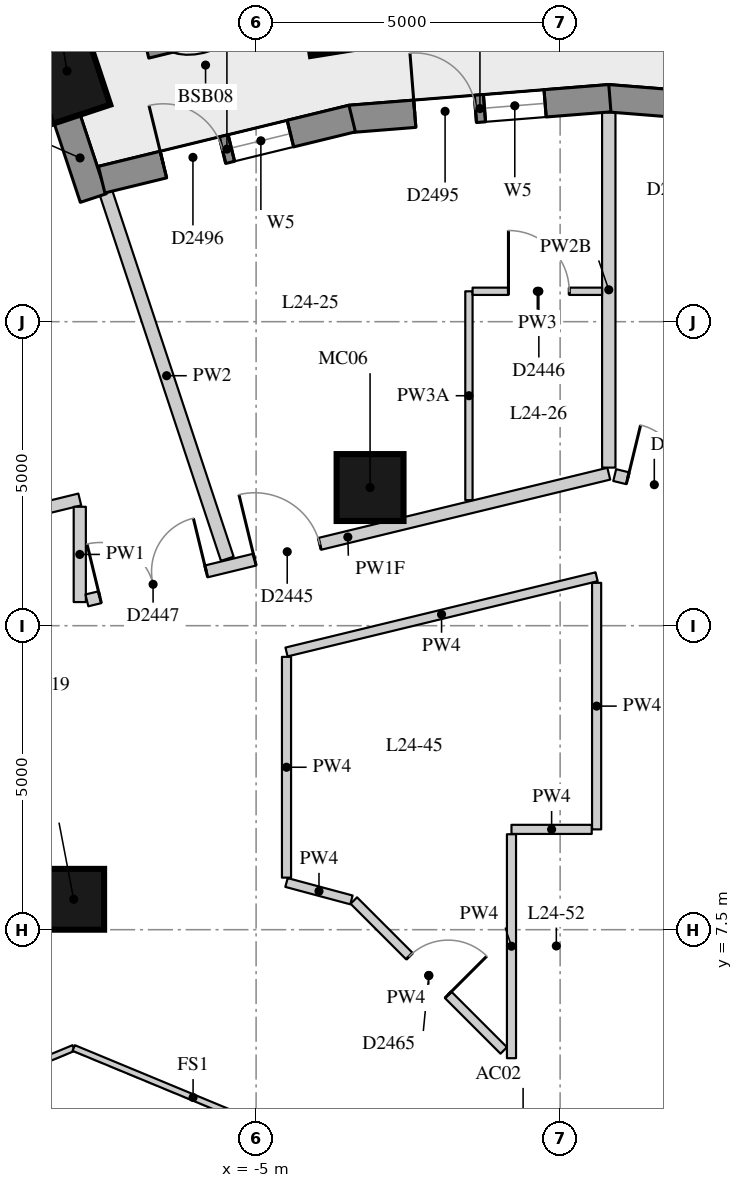
"""IFC4 building model, lengths in metres.
Left out: names, types, materials, properties, quantities, classifications, styles, units other than length and angle.
Written with IfcOpenShell. Run it as: python <this file> out.ifc"""

import sys

from ifc_helpers import new_model, si_unit, direction, frame, frame_2d, origin, origin_2d, place, context, subcontext, project, spatial, rectangle, extrude, element, fill, save


model = new_model("IFC4")
c1 = context("Model", 3, precision=1e-05, world=origin(), true_north=direction((0.0, 1.0)))
c2 = subcontext(c1, "Body", "Model", "MODEL_VIEW")
j1 = project(units=[si_unit("LENGTHUNIT", "METRE"), si_unit("PLANEANGLEUNIT", "RADIAN")], contexts=[c1])
p1 = place(None, origin())
s1 = spatial("IfcSite", under=j1, at=p1, CompositionType="ELEMENT")
p2 = place(p1, origin())
s2 = spatial("IfcBuilding", under=s1, at=p2, CompositionType="ELEMENT")
p3 = place(p2, frame((0.0, 0.0, 88.9)))
s3 = spatial("IfcBuildingStorey", under=s2, at=p3, CompositionType="ELEMENT", Elevation=88.9)
for number, where, z_axis, x_axis in (
    (1, (-3.724, 22.691, 0.0), (0.0, 0.0, 1.0), (-0.159, 0.987, 0.0)),
    (2, (-8.11, 21.624, 0.0), (0.0, 0.0, 1.0), (-0.315, 0.949, 0.0)),
):
    element("IfcColumn", number, at=place(p3, frame(where, z_axis=z_axis, x_axis=x_axis)), inside=s3, PredefinedType="COLUMN", context=c2, shape_type="SweptSolid", body=[
        extrude(rectangle(XDim=1.5, YDim=1.0, at=origin_2d()), origin(), (0.0, 0.0, 1.0), 3.3),
    ])
p4 = place(p3, frame((-8.0, 8.0, 0.0), z_axis=(0.0, 0.0, 1.0), x_axis=(1.0, 0.0, 0.0)))
e3 = element("IfcColumn", 3, at=p4, inside=s3, PredefinedType="COLUMN", context=c2, shape_type="SweptSolid", body=[
    extrude(rectangle(XDim=1.0, YDim=1.0, at=origin_2d()), origin(), (0.0, 0.0, 1.0), 3.3),
])
p5 = place(p3, frame((-3.126, 14.772, 0.0), z_axis=(0.0, 0.0, 1.0), x_axis=(1.0, 0.0, 0.0)))
e4 = element("IfcColumn", 4, at=p5, inside=s3, PredefinedType="COLUMN", context=c2, shape_type="SweptSolid", body=[
    extrude(rectangle(XDim=1.1, YDim=1.1, at=origin_2d()), origin(), (0.0, 0.0, 1.0), 3.3),
])
p6 = place(p3, frame((-8.114, 20.853, 0.0), z_axis=(0.0, 0.0, 1.0), x_axis=(0.314488854508, -0.949261165534, 0.0)))
e5 = element("IfcWall", 5, at=p6, inside=s3, PredefinedType="SOLIDWALL", context=c2, shape_type="SweptSolid", body=[
    extrude(rectangle(XDim=1.39, YDim=0.45, at=frame_2d((0.695, 0.0))), origin(), (0.0, 0.0, 1.0), 3.02),
])
p7 = place(p3, frame((5.038, 20.837, 0.0), z_axis=(0.0, 0.0, 1.0), x_axis=(-0.996839780714, 0.079438350855, 0.0)))
e6 = element("IfcWall", 6, at=p7, inside=s3, PredefinedType="SOLIDWALL", context=c2, shape_type="SweptSolid", body=[
    extrude(rectangle(XDim=4.269, YDim=0.45, at=frame_2d((2.134, 0.0))), origin(), (0.0, 0.0, 1.0), 3.02),
])
p8 = place(p7, frame((1.06, 0.0, 0.4)))
e7 = element("IfcOpeningElement", 7, at=p8, cuts=e6, PredefinedType="OPENING", context=c2, shape_type="SweptSolid", body=[
    extrude(rectangle(XDim=1.0, YDim=1.75, at=frame_2d((0.5, 0.875))), frame((0.0, 0.235, 0.0), z_axis=(0.0, -1.0, 0.0), x_axis=(1.0, 0.0, 0.0)), (0.0, 0.0, 1.0), 0.47),
])
p9 = place(p7, frame((2.209, 0.0, 0.0)))
e8 = element("IfcOpeningElement", 8, at=p9, cuts=e6, PredefinedType="OPENING", context=c2, shape_type="SweptSolid", body=[
    extrude(rectangle(XDim=1.0, YDim=2.15, at=frame_2d((0.5, 1.075))), frame((0.0, 0.235, 0.0), z_axis=(0.0, -1.0, 0.0), x_axis=(1.0, 0.0, 0.0)), (0.0, 0.0, 1.0), 0.47),
])
p10 = place(p3, frame((0.818, 21.176, 0.0), z_axis=(0.0, 0.0, 1.0), x_axis=(-0.996843824935, -0.079387585235, 0.0)))
e9 = element("IfcWall", 9, at=p10, inside=s3, PredefinedType="SOLIDWALL", context=c2, shape_type="SweptSolid", body=[
    extrude(rectangle(XDim=4.287, YDim=0.45, at=frame_2d((2.144, 0.0))), origin(), (0.0, 0.0, 1.0), 3.02),
])
p11 = place(p10, frame((1.068, 0.0, 0.4)))
e10 = element("IfcOpeningElement", 10, at=p11, cuts=e9, PredefinedType="OPENING", context=c2, shape_type="SweptSolid", body=[
    extrude(rectangle(XDim=1.0, YDim=1.75, at=frame_2d((0.5, 0.875))), frame((0.0, 0.235, 0.0), z_axis=(0.0, -1.0, 0.0), x_axis=(1.0, 0.0, 0.0)), (0.0, 0.0, 1.0), 0.47),
])
p12 = place(p10, frame((2.219, 0.0, 0.0)))
e11 = element("IfcOpeningElement", 11, at=p12, cuts=e9, PredefinedType="OPENING", context=c2, shape_type="SweptSolid", body=[
    extrude(rectangle(XDim=1.0, YDim=2.15, at=frame_2d((0.5, 1.075))), frame((0.0, 0.235, 0.0), z_axis=(0.0, -1.0, 0.0), x_axis=(1.0, 0.0, 0.0)), (0.0, 0.0, 1.0), 0.47),
])
p13 = place(p3, frame((-3.42, 20.841, 0.0), z_axis=(0.0, 0.0, 1.0), x_axis=(-0.971511611373, -0.23699195971, 0.0)))
e12 = element("IfcWall", 12, at=p13, inside=s3, PredefinedType="SOLIDWALL", context=c2, shape_type="SweptSolid", body=[
    extrude(rectangle(XDim=4.241, YDim=0.45, at=frame_2d((2.121, 0.0))), origin(), (0.0, 0.0, 1.0), 3.02),
])
p14 = place(p13, frame((1.045, 0.0, 0.4)))
e13 = element("IfcOpeningElement", 13, at=p14, cuts=e12, PredefinedType="OPENING", context=c2, shape_type="SweptSolid", body=[
    extrude(rectangle(XDim=1.0, YDim=1.75, at=frame_2d((0.5, 0.875))), frame((0.0, 0.235, 0.0), z_axis=(0.0, -1.0, 0.0), x_axis=(1.0, 0.0, 0.0)), (0.0, 0.0, 1.0), 0.47),
])
p15 = place(p13, frame((2.196, 0.0, 0.0)))
e14 = element("IfcOpeningElement", 14, at=p15, cuts=e12, PredefinedType="OPENING", context=c2, shape_type="SweptSolid", body=[
    extrude(rectangle(XDim=1.0, YDim=2.15, at=frame_2d((0.5, 1.075))), frame((0.0, 0.235, 0.0), z_axis=(0.0, -1.0, 0.0), x_axis=(1.0, 0.0, 0.0)), (0.0, 0.0, 1.0), 0.47),
])
p16 = place(p3, frame((-5.099, 22.601, 0.0), z_axis=(0.0, 0.0, 1.0), x_axis=(-0.971654974133, -0.23640349245, 0.0)))
e15 = element("IfcWall", 15, at=p16, inside=s3, PredefinedType="USERDEFINED", context=c2, shape_type="SweptSolid", body=[
    extrude(rectangle(XDim=1.8, YDim=0.7, at=frame_2d((0.9, 0.0))), origin(), (0.0, 0.0, 1.0), 0.75),
])
p17 = place(p3, frame((-9.884, 14.092, 0.0), z_axis=(0.0, 0.0, 1.0), x_axis=(0.971512281799, 0.236989211388, 0.0)))
e16 = element("IfcWall", 16, at=p17, inside=s3, PredefinedType="PARTITIONING", context=c2, shape_type="SweptSolid", body=[
    extrude(rectangle(XDim=2.042, YDim=0.2, at=frame_2d((1.021, 0.0))), origin(), (0.0, 0.0, 1.0), 3.02),
])
p18 = place(p3, frame((-7.9, 14.456, 0.0), z_axis=(0.0, 0.0, 1.0), x_axis=(0.0, -1.0, 0.0)))
e17 = element("IfcWall", 17, at=p18, inside=s3, PredefinedType="PARTITIONING", context=c2, shape_type="SweptSolid", body=[
    extrude(rectangle(XDim=1.567, YDim=0.2, at=frame_2d((0.784, 0.0))), origin(), (0.0, 0.0, 1.0), 3.02),
])
p19 = place(p3, frame((-7.783, 12.916, 0.0), z_axis=(0.0, 0.0, 1.0), x_axis=(0.971770455305, 0.235928341232, 0.0)))
e18 = element("IfcWall", 18, at=p19, inside=s3, PredefinedType="PARTITIONING", context=c2, shape_type="SweptSolid", body=[
    extrude(rectangle(XDim=8.832, YDim=0.2, at=frame_2d((4.416, 0.0))), origin(), (0.0, 0.0, 1.0), 2.42),
])
p20 = place(p19, frame((2.84, 0.0, 0.0)))
e19 = element("IfcOpeningElement", 19, at=p20, cuts=e18, PredefinedType="OPENING", context=c2, shape_type="SweptSolid", body=[
    extrude(rectangle(XDim=1.1, YDim=2.1, at=frame_2d((0.55, 1.05))), frame((0.0, 0.11, 0.0), z_axis=(0.0, -1.0, 0.0), x_axis=(1.0, 0.0, 0.0)), (0.0, 0.0, 1.0), 0.22),
])
p21 = place(p19, frame((0.22, 0.0, 0.0)))
e20 = element("IfcOpeningElement", 20, at=p21, cuts=e18, PredefinedType="OPENING", context=c2, shape_type="SweptSolid", body=[
    extrude(rectangle(XDim=1.8, YDim=2.1, at=frame_2d((0.9, 1.05))), frame((0.0, 0.11, 0.0), z_axis=(0.0, -1.0, 0.0), x_axis=(1.0, 0.0, 0.0)), (0.0, 0.0, 1.0), 0.22),
])
p22 = place(p3, frame((0.898, 14.977, 0.0), z_axis=(0.0, 0.0, 1.0), x_axis=(0.971773711573, -0.235914928515, 0.0)))
e21 = element("IfcWall", 21, at=p22, inside=s3, PredefinedType="PARTITIONING", context=c2, shape_type="SweptSolid", body=[
    extrude(rectangle(XDim=5.836, YDim=0.2, at=frame_2d((2.918, 0.0))), origin(), (0.0, 0.0, 1.0), 2.42),
])
p23 = place(p22, frame((0.22, 0.0, 0.0)))
e22 = element("IfcOpeningElement", 22, at=p23, cuts=e21, PredefinedType="OPENING", context=c2, shape_type="SweptSolid", body=[
    extrude(rectangle(XDim=0.9, YDim=2.1, at=frame_2d((0.45, 1.05))), frame((0.0, 0.11, 0.0), z_axis=(0.0, -1.0, 0.0), x_axis=(1.0, 0.0, 0.0)), (0.0, 0.0, 1.0), 0.22),
])
p24 = place(p3, frame((-4.5, 12.067, 0.0), z_axis=(0.0, 0.0, 1.0), x_axis=(0.971799407652, 0.23580905684, 0.0)))
e23 = element("IfcWall", 23, at=p24, inside=s3, PredefinedType="PARTITIONING", context=c2, shape_type="SweptSolid", body=[
    extrude(rectangle(XDim=5.248, YDim=0.15, at=frame_2d((2.624, 0.0))), origin(), (0.0, 0.0, 1.0), 3.02),
])
p25 = place(p3, frame((0.6, 13.205, 0.0), z_axis=(0.0, 0.0, 1.0), x_axis=(0.0, -1.0, 0.0)))
e24 = element("IfcWall", 24, at=p25, inside=s3, PredefinedType="PARTITIONING", context=c2, shape_type="SweptSolid", body=[
    extrude(rectangle(XDim=4.055, YDim=0.15, at=frame_2d((2.027, 0.0))), origin(), (0.0, 0.0, 1.0), 3.02),
])
p26 = place(p3, frame((0.52, 9.15, 0.0), z_axis=(0.0, 0.0, 1.0), x_axis=(-1.0, 0.0, 0.0)))
e25 = element("IfcWall", 25, at=p26, inside=s3, PredefinedType="PARTITIONING", context=c2, shape_type="SweptSolid", body=[
    extrude(rectangle(XDim=1.32, YDim=0.15, at=frame_2d((0.66, 0.0))), origin(), (0.0, 0.0, 1.0), 3.02),
])
p27 = place(p3, frame((-0.8, 9.07, 0.0), z_axis=(0.0, 0.0, 1.0), x_axis=(0.0, -1.0, 0.0)))
e26 = element("IfcWall", 26, at=p27, inside=s3, PredefinedType="PARTITIONING", context=c2, shape_type="SweptSolid", body=[
    extrude(rectangle(XDim=3.683, YDim=0.15, at=frame_2d((1.842, 0.0))), origin(), (0.0, 0.0, 1.0), 3.02),
])
p28 = place(p3, frame((-0.927, 5.514, 0.0), z_axis=(0.0, 0.0, 1.0), x_axis=(-0.707106781187, 0.707106781187, 0.0)))
e27 = element("IfcWall", 27, at=p28, inside=s3, PredefinedType="PARTITIONING", context=c2, shape_type="SweptSolid", body=[
    extrude(rectangle(XDim=3.487, YDim=0.15, at=frame_2d((1.743, 0.0))), origin(), (0.0, 0.0, 1.0), 3.02),
])
p29 = place(p28, frame((1.293, 0.0, 0.0)))
e28 = element("IfcOpeningElement", 28, at=p29, cuts=e27, PredefinedType="OPENING", context=c2, shape_type="SweptSolid", body=[
    extrude(rectangle(XDim=0.9, YDim=2.1, at=frame_2d((0.45, 1.05))), frame((0.0, 0.085, 0.0), z_axis=(0.0, -1.0, 0.0), x_axis=(1.0, 0.0, 0.0)), (0.0, 0.0, 1.0), 0.17),
])
p30 = place(p3, frame((-3.432, 7.99, 0.0), z_axis=(0.0, 0.0, 1.0), x_axis=(-0.965900750832, 0.258912609855, 0.0)))
e29 = element("IfcWall", 29, at=p30, inside=s3, PredefinedType="PARTITIONING", context=c2, shape_type="SweptSolid", body=[
    extrude(rectangle(XDim=1.106, YDim=0.15, at=frame_2d((0.553, 0.0))), origin(), (0.0, 0.0, 1.0), 3.02),
])
p31 = place(p3, frame((-4.5, 8.356, 0.0), z_axis=(0.0, 0.0, 1.0), x_axis=(0.0, 1.0, 0.0)))
e30 = element("IfcWall", 30, at=p31, inside=s3, PredefinedType="PARTITIONING", context=c2, shape_type="SweptSolid", body=[
    extrude(rectangle(XDim=3.631, YDim=0.15, at=frame_2d((1.815, 0.0))), origin(), (0.0, 0.0, 1.0), 3.02),
])
p32 = place(p3, frame((0.8, 20.948, 0.0), z_axis=(0.0, 0.0, 1.0), x_axis=(0.0, -1.0, 0.0)))
e31 = element("IfcWall", 31, at=p32, inside=s3, PredefinedType="PARTITIONING", context=c2, shape_type="SweptSolid", body=[
    extrude(rectangle(XDim=5.848, YDim=0.22, at=frame_2d((2.924, 0.0))), origin(), (0.0, 0.0, 1.0), 2.57),
])
p33 = place(p3, frame((-7.469, 19.622, 0.0), z_axis=(0.0, 0.0, 1.0), x_axis=(0.314576080141, -0.94923226336, 0.0)))
e32 = element("IfcWall", 32, at=p33, inside=s3, PredefinedType="PARTITIONING", context=c2, shape_type="SweptSolid", body=[
    extrude(rectangle(XDim=6.343, YDim=0.22, at=frame_2d((3.171, 0.0))), origin(), (0.0, 0.0, 1.0), 3.02),
])
p34 = place(p3, frame((-1.5, 14.565, 0.0), z_axis=(0.0, 0.0, 1.0), x_axis=(0.0, 1.0, 0.0)))
e33 = element("IfcWall", 33, at=p34, inside=s3, PredefinedType="PARTITIONING", context=c2, shape_type="SweptSolid", body=[
    extrude(rectangle(XDim=3.435, YDim=0.12, at=frame_2d((1.718, 0.0))), origin(), (0.0, 0.0, 1.0), 2.57),
])
p35 = place(p3, frame((-1.44, 18.0, 0.0), z_axis=(0.0, 0.0, 1.0), x_axis=(1.0, 0.0, 0.0)))
e34 = element("IfcWall", 34, at=p35, inside=s3, PredefinedType="PARTITIONING", context=c2, shape_type="SweptSolid", body=[
    extrude(rectangle(XDim=2.13, YDim=0.12, at=frame_2d((1.065, 0.0))), origin(), (0.0, 0.0, 1.0), 3.02),
])
p36 = place(p35, frame((0.59, 0.0, 0.0)))
e35 = element("IfcOpeningElement", 35, at=p36, cuts=e34, PredefinedType="OPENING", context=c2, shape_type="SweptSolid", body=[
    extrude(rectangle(XDim=1.0, YDim=2.1, at=frame_2d((0.5, 1.05))), frame((0.0, 0.07, 0.0), z_axis=(0.0, -1.0, 0.0), x_axis=(1.0, 0.0, 0.0)), (0.0, 0.0, 1.0), 0.14),
])
for number, where, z_axis, x_axis in (
    (36, (-11.927, 3.927, 0.0), (0.0, 0.0, 1.0), (0.924, 0.383, 0.0)),
    (37, (-8.0, 5.554, 0.0), (0.0, 0.0, 1.0), (0.924, -0.383, 0.0)),
):
    element("IfcWall", number, at=place(p3, frame(where, z_axis=z_axis, x_axis=x_axis)), inside=s3, PredefinedType="PARTITIONING", context=c2, shape_type="SweptSolid", body=[
        extrude(rectangle(XDim=4.251, YDim=0.1, at=frame_2d((2.125, 0.0))), origin(), (0.0, 0.0, 1.0), 3.02),
    ])
p37 = place(p11, origin())
e38 = element("IfcWindow", 38, at=p37, inside=s3, PartitioningType="SINGLE_PANEL", PredefinedType="WINDOW", context=c2, shape_type="SweptSolid", body=[
    extrude(rectangle(XDim=1.0, YDim=1.75, at=frame_2d((0.5, 0.875))), frame((0.0, 0.035, 0.0), z_axis=(0.0, -1.0, 0.0), x_axis=(1.0, 0.0, 0.0)), (0.0, 0.0, 1.0), 0.06),
])
fill(e10, e38)
p38 = place(p12, frame((1.0, 0.0, 0.0), z_axis=(0.0, 0.0, 1.0), x_axis=(-1.0, 0.0, 0.0)))
e39 = element("IfcDoor", 39, at=p38, inside=s3, OperationType="SINGLE_SWING_LEFT", PredefinedType="DOOR", context=c2, shape_type="SweptSolid", body=[
    extrude(rectangle(XDim=1.0, YDim=2.15, at=frame_2d((0.5, 1.075))), frame((0.0, 0.075, 0.0), z_axis=(0.0, -1.0, 0.0), x_axis=(1.0, 0.0, 0.0)), (0.0, 0.0, 1.0), 0.05),
])
fill(e11, e39)
p39 = place(p14, origin())
e40 = element("IfcWindow", 40, at=p39, inside=s3, PartitioningType="SINGLE_PANEL", PredefinedType="WINDOW", context=c2, shape_type="SweptSolid", body=[
    extrude(rectangle(XDim=1.0, YDim=1.75, at=frame_2d((0.5, 0.875))), frame((0.0, 0.035, 0.0), z_axis=(0.0, -1.0, 0.0), x_axis=(1.0, 0.0, 0.0)), (0.0, 0.0, 1.0), 0.06),
])
fill(e13, e40)
p40 = place(p15, frame((1.0, 0.0, 0.0), z_axis=(0.0, 0.0, 1.0), x_axis=(-1.0, 0.0, 0.0)))
e41 = element("IfcDoor", 41, at=p40, inside=s3, OperationType="SINGLE_SWING_LEFT", PredefinedType="DOOR", context=c2, shape_type="SweptSolid", body=[
    extrude(rectangle(XDim=1.0, YDim=2.15, at=frame_2d((0.5, 1.075))), frame((0.0, 0.075, 0.0), z_axis=(0.0, -1.0, 0.0), x_axis=(1.0, 0.0, 0.0)), (0.0, 0.0, 1.0), 0.05),
])
fill(e14, e41)
p41 = place(p23, origin())
e42 = element("IfcDoor", 42, at=p41, inside=s3, OperationType="SINGLE_SWING_LEFT", PredefinedType="DOOR", context=c2, shape_type="SweptSolid", body=[
    extrude(rectangle(XDim=0.9, YDim=2.1, at=frame_2d((0.45, 1.05))), frame((0.0, 0.025, 0.0), z_axis=(0.0, -1.0, 0.0), x_axis=(1.0, 0.0, 0.0)), (0.0, 0.0, 1.0), 0.05),
])
fill(e22, e42)
p42 = place(p20, origin())
e43 = element("IfcDoor", 43, at=p42, inside=s3, OperationType="SINGLE_SWING_LEFT", PredefinedType="DOOR", context=c2, shape_type="SweptSolid", body=[
    extrude(rectangle(XDim=1.1, YDim=2.1, at=frame_2d((0.55, 1.05))), frame((0.0, 0.025, 0.0), z_axis=(0.0, -1.0, 0.0), x_axis=(1.0, 0.0, 0.0)), (0.0, 0.0, 1.0), 0.05),
])
fill(e19, e43)
p43 = place(p36, origin())
e44 = element("IfcDoor", 44, at=p43, inside=s3, OperationType="SINGLE_SWING_LEFT", PredefinedType="DOOR", context=c2, shape_type="SweptSolid", body=[
    extrude(rectangle(XDim=1.0, YDim=2.1, at=frame_2d((0.5, 1.05))), frame((0.0, 0.025, 0.0), z_axis=(0.0, -1.0, 0.0), x_axis=(1.0, 0.0, 0.0)), (0.0, 0.0, 1.0), 0.05),
])
fill(e35, e44)
p44 = place(p21, origin())
e45 = element("IfcDoor", 45, at=p44, inside=s3, OperationType="DOUBLE_DOOR_SINGLE_SWING", PredefinedType="DOOR", context=c2, shape_type="SweptSolid", body=[
    extrude(rectangle(XDim=1.8, YDim=2.1, at=frame_2d((0.9, 1.05))), frame((0.0, 0.025, 0.0), z_axis=(0.0, -1.0, 0.0), x_axis=(1.0, 0.0, 0.0)), (0.0, 0.0, 1.0), 0.05),
])
fill(e20, e45)
p45 = place(p29, origin())
e46 = element("IfcDoor", 46, at=p45, inside=s3, OperationType="SINGLE_SWING_RIGHT", PredefinedType="DOOR", context=c2, shape_type="SweptSolid", body=[
    extrude(rectangle(XDim=0.9, YDim=2.1, at=frame_2d((0.45, 1.05))), frame((0.0, 0.025, 0.0), z_axis=(0.0, -1.0, 0.0), x_axis=(1.0, 0.0, 0.0)), (0.0, 0.0, 1.0), 0.05),
])
fill(e28, e46)
save(model, sys.argv[1])
